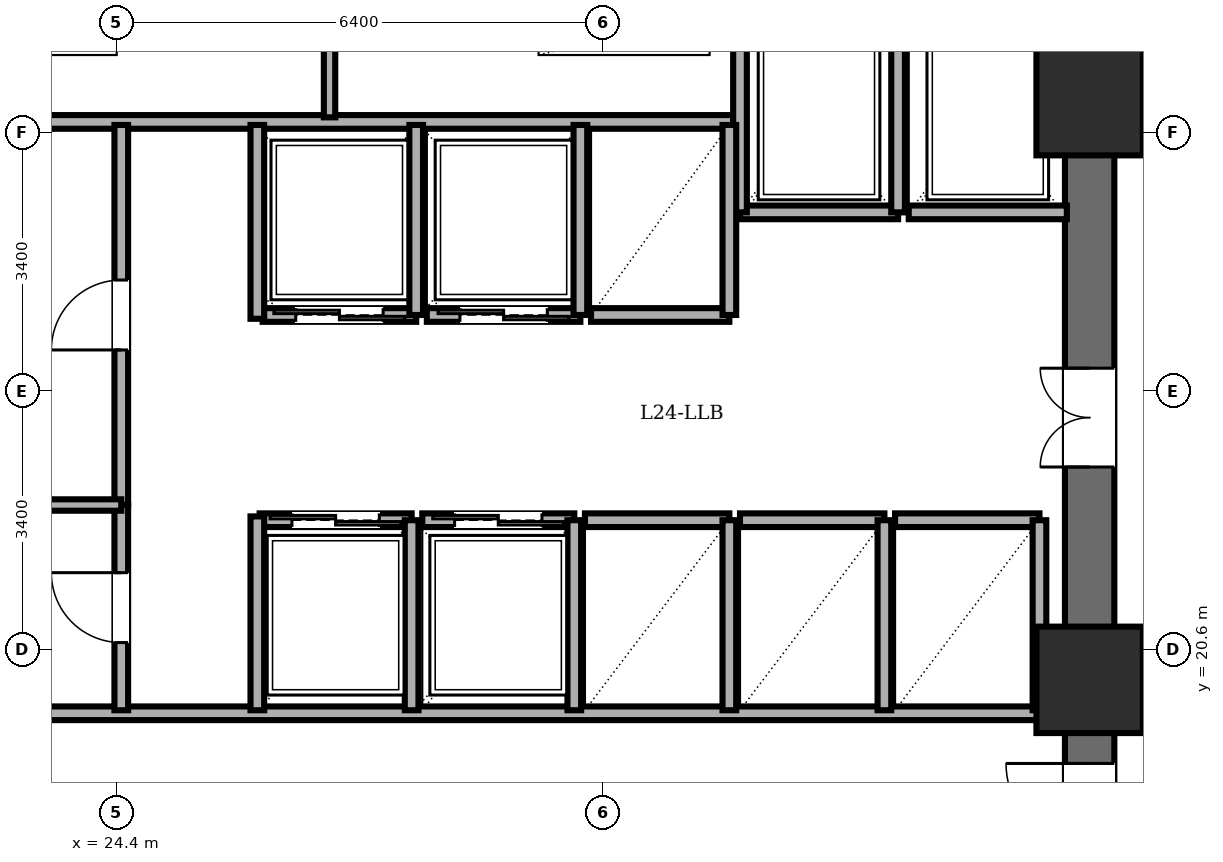
"""IFC4 building model, lengths in metres.
Left out: names, types, materials, properties, quantities, classifications, styles, units other than length and angle.
Written with IfcOpenShell. Run it as: python <this file> out.ifc"""

import sys

from ifc_helpers import new_model, si_unit, direction, frame, frame_2d, origin, origin_2d, place, context, subcontext, project, spatial, rectangle, extrude, element, fill, save


model = new_model("IFC4")
c1 = context("Model", 3, precision=1e-05, world=origin(), true_north=direction((0.0, 1.0)))
c2 = subcontext(c1, "Body", "Model", "MODEL_VIEW")
j1 = project(units=[si_unit("LENGTHUNIT", "METRE"), si_unit("PLANEANGLEUNIT", "RADIAN")], contexts=[c1])
p1 = place(None, origin())
s1 = spatial("IfcSite", under=j1, at=p1, CompositionType="ELEMENT")
p2 = place(p1, origin())
s2 = spatial("IfcBuilding", under=s1, at=p2, CompositionType="ELEMENT")
p3 = place(p2, frame((0.0, 0.0, 93.5)))
s3 = spatial("IfcBuildingStorey", under=s2, at=p3, CompositionType="ELEMENT", Elevation=93.5)
for number, where, z_axis, x_axis in (
    (1, (37.2, 20.2, 0.0), (0.0, 0.0, 1.0), (1.0, 0.0, 0.0)),
    (2, (37.2, 27.8, 0.0), (0.0, 0.0, 1.0), (1.0, 0.0, 0.0)),
):
    element("IfcColumn", number, at=place(p3, frame(where, z_axis=z_axis, x_axis=x_axis)), inside=s3, PredefinedType="COLUMN", context=c2, shape_type="SweptSolid", body=[
        extrude(rectangle(XDim=1.4, YDim=1.4, at=origin_2d()), origin(), (0.0, 0.0, 1.0), 3.6),
    ])
p4 = place(p3, frame((37.2, 14.4, 0.0), z_axis=(0.0, 0.0, 1.0), x_axis=(0.0, 1.0, 0.0)))
e3 = element("IfcWall", 3, at=p4, inside=s3, PredefinedType="SHEAR", context=c2, shape_type="SweptSolid", body=[
    extrude(rectangle(XDim=19.2, YDim=0.65, at=frame_2d((9.6, 0.0))), origin(), (0.0, 0.0, 1.0), 3.4),
])
p5 = place(p4, frame((15.8, 0.0, 0.0)))
e4 = element("IfcOpeningElement", 4, at=p5, cuts=e3, PredefinedType="OPENING", context=c2, shape_type="SweptSolid", body=[
    extrude(rectangle(XDim=1.15, YDim=2.15, at=frame_2d((0.575, 1.075))), frame((0.0, 0.335, 0.0), z_axis=(0.0, -1.0, 0.0), x_axis=(1.0, 0.0, 0.0)), (0.0, 0.0, 1.0), 0.67),
])
p6 = place(p4, frame((3.6, 0.0, 0.0)))
e5 = element("IfcOpeningElement", 5, at=p6, cuts=e3, PredefinedType="OPENING", context=c2, shape_type="SweptSolid", body=[
    extrude(rectangle(XDim=1.1, YDim=2.15, at=frame_2d((0.55, 1.075))), frame((0.0, 0.335, 0.0), z_axis=(0.0, -1.0, 0.0), x_axis=(1.0, 0.0, 0.0)), (0.0, 0.0, 1.0), 0.67),
])
p7 = place(p4, frame((8.6, 0.0, 0.0)))
e6 = element("IfcOpeningElement", 6, at=p7, cuts=e3, PredefinedType="OPENING", context=c2, shape_type="SweptSolid", body=[
    extrude(rectangle(XDim=1.3, YDim=2.2, at=frame_2d((0.65, 1.1))), frame((0.0, 0.335, 0.0), z_axis=(0.0, -1.0, 0.0), x_axis=(1.0, 0.0, 0.0)), (0.0, 0.0, 1.0), 0.67),
])
p8 = place(p3, frame((21.95, 27.54, 0.0), z_axis=(0.0, 0.0, 1.0), x_axis=(1.0, 0.0, 0.0)))
e7 = element("IfcWall", 7, at=p8, inside=s3, PredefinedType="PARTITIONING", context=c2, shape_type="SweptSolid", body=[
    extrude(rectangle(XDim=10.56, YDim=0.18, at=frame_2d((5.28, 0.0))), origin(), (0.0, 0.0, 1.0), 3.4),
])
p9 = place(p3, frame((27.2, 27.6, 0.0), z_axis=(0.0, 0.0, 1.0), x_axis=(0.0, 1.0, 0.0)))
e8 = element("IfcWall", 8, at=p9, inside=s3, PredefinedType="PARTITIONING", context=c2, shape_type="SweptSolid", body=[
    extrude(rectangle(XDim=1.52, YDim=0.15, at=frame_2d((0.76, 0.0))), origin(), (0.0, 0.0, 1.0), 3.4),
])
p10 = place(p3, frame((21.95, 19.76, 0.0), z_axis=(0.0, 0.0, 1.0), x_axis=(1.0, 0.0, 0.0)))
e9 = element("IfcWall", 9, at=p10, inside=s3, PredefinedType="PARTITIONING", context=c2, shape_type="SweptSolid", body=[
    extrude(rectangle(XDim=14.87, YDim=0.18, at=frame_2d((7.435, 0.0))), origin(), (0.0, 0.0, 1.0), 3.4),
])
p11 = place(p3, frame((34.68, 26.35, 0.0), z_axis=(0.0, 0.0, 1.0), x_axis=(-1.0, 0.0, 0.0)))
e10 = element("IfcWall", 10, at=p11, inside=s3, PredefinedType="PARTITIONING", context=c2, shape_type="SweptSolid", body=[
    extrude(rectangle(XDim=2.08, YDim=0.18, at=frame_2d((1.04, 0.0))), origin(), (0.0, 0.0, 1.0), 3.4),
])
for number, where, z_axis, x_axis in (
    (11, (34.68, 26.35, 0.0), (0.0, 0.0, 1.0), (0.0, 1.0, 0.0)),
    (12, (32.6, 29.08, 0.0), (0.0, 0.0, 1.0), (0.0, -1.0, 0.0)),
):
    element("IfcWall", number, at=place(p3, frame(where, z_axis=z_axis, x_axis=x_axis)), inside=s3, PredefinedType="PARTITIONING", context=c2, shape_type="SweptSolid", body=[
        extrude(rectangle(XDim=2.73, YDim=0.18, at=frame_2d((1.365, 0.0))), origin(), (0.0, 0.0, 1.0), 3.4),
    ])
p12 = place(p3, frame((36.9, 26.35, 0.0), z_axis=(0.0, 0.0, 1.0), x_axis=(-1.0, 0.0, 0.0)))
e13 = element("IfcWall", 13, at=p12, inside=s3, PredefinedType="PARTITIONING", context=c2, shape_type="SweptSolid", body=[
    extrude(rectangle(XDim=2.08, YDim=0.18, at=frame_2d((1.04, 0.0))), origin(), (0.0, 0.0, 1.0), 3.4),
])
p13 = place(p3, frame((28.34, 25.0, 0.0), z_axis=(0.0, 0.0, 1.0), x_axis=(-1.0, 0.0, 0.0)))
e14 = element("IfcWall", 14, at=p13, inside=s3, PredefinedType="PARTITIONING", context=c2, shape_type="SweptSolid", body=[
    extrude(rectangle(XDim=2.02, YDim=0.18, at=frame_2d((1.01, 0.0))), origin(), (0.0, 0.0, 1.0), 3.4),
])
p14 = place(p13, frame((0.435, 0.0, 0.0)))
e15 = element("IfcOpeningElement", 15, at=p14, cuts=e14, PredefinedType="OPENING", context=c2, shape_type="SweptSolid", body=[
    extrude(rectangle(XDim=1.15, YDim=2.2, at=frame_2d((0.575, 1.1))), frame((0.0, 0.1, 0.0), z_axis=(0.0, -1.0, 0.0), x_axis=(1.0, 0.0, 0.0)), (0.0, 0.0, 1.0), 0.2),
])
p15 = place(p3, frame((28.34, 25.0, 0.0), z_axis=(0.0, 0.0, 1.0), x_axis=(0.0, 1.0, 0.0)))
e16 = element("IfcWall", 16, at=p15, inside=s3, PredefinedType="PARTITIONING", context=c2, shape_type="SweptSolid", body=[
    extrude(rectangle(XDim=2.5, YDim=0.18, at=frame_2d((1.25, 0.0))), origin(), (0.0, 0.0, 1.0), 3.4),
])
p16 = place(p3, frame((30.5, 25.0, 0.0), z_axis=(0.0, 0.0, 1.0), x_axis=(-1.0, 0.0, 0.0)))
e17 = element("IfcWall", 17, at=p16, inside=s3, PredefinedType="PARTITIONING", context=c2, shape_type="SweptSolid", body=[
    extrude(rectangle(XDim=2.02, YDim=0.18, at=frame_2d((1.01, 0.0))), origin(), (0.0, 0.0, 1.0), 3.4),
])
p17 = place(p16, frame((0.435, 0.0, 0.0)))
e18 = element("IfcOpeningElement", 18, at=p17, cuts=e17, PredefinedType="OPENING", context=c2, shape_type="SweptSolid", body=[
    extrude(rectangle(XDim=1.15, YDim=2.2, at=frame_2d((0.575, 1.1))), frame((0.0, 0.1, 0.0), z_axis=(0.0, -1.0, 0.0), x_axis=(1.0, 0.0, 0.0)), (0.0, 0.0, 1.0), 0.2),
])
p18 = place(p3, frame((30.5, 25.0, 0.0), z_axis=(0.0, 0.0, 1.0), x_axis=(0.0, 1.0, 0.0)))
e19 = element("IfcWall", 19, at=p18, inside=s3, PredefinedType="PARTITIONING", context=c2, shape_type="SweptSolid", body=[
    extrude(rectangle(XDim=2.5, YDim=0.18, at=frame_2d((1.25, 0.0))), origin(), (0.0, 0.0, 1.0), 3.4),
])
p19 = place(p3, frame((26.28, 22.3, 0.0), z_axis=(0.0, 0.0, 1.0), x_axis=(1.0, 0.0, 0.0)))
e20 = element("IfcWall", 20, at=p19, inside=s3, PredefinedType="PARTITIONING", context=c2, shape_type="SweptSolid", body=[
    extrude(rectangle(XDim=2.0, YDim=0.18, at=frame_2d((1.0, 0.0))), origin(), (0.0, 0.0, 1.0), 3.4),
])
p20 = place(p19, frame((0.425, 0.0, 0.0)))
e21 = element("IfcOpeningElement", 21, at=p20, cuts=e20, PredefinedType="OPENING", context=c2, shape_type="SweptSolid", body=[
    extrude(rectangle(XDim=1.15, YDim=2.2, at=frame_2d((0.575, 1.1))), frame((0.0, 0.1, 0.0), z_axis=(0.0, -1.0, 0.0), x_axis=(1.0, 0.0, 0.0)), (0.0, 0.0, 1.0), 0.2),
])
p21 = place(p3, frame((28.28, 19.8, 0.0), z_axis=(0.0, 0.0, 1.0), x_axis=(0.0, 1.0, 0.0)))
e22 = element("IfcWall", 22, at=p21, inside=s3, PredefinedType="PARTITIONING", context=c2, shape_type="SweptSolid", body=[
    extrude(rectangle(XDim=2.5, YDim=0.18, at=frame_2d((1.25, 0.0))), origin(), (0.0, 0.0, 1.0), 3.4),
])
p22 = place(p3, frame((28.42, 22.3, 0.0), z_axis=(0.0, 0.0, 1.0), x_axis=(1.0, 0.0, 0.0)))
e23 = element("IfcWall", 23, at=p22, inside=s3, PredefinedType="PARTITIONING", context=c2, shape_type="SweptSolid", body=[
    extrude(rectangle(XDim=2.0, YDim=0.18, at=frame_2d((1.0, 0.0))), origin(), (0.0, 0.0, 1.0), 3.4),
])
p23 = place(p22, frame((0.425, 0.0, 0.0)))
e24 = element("IfcOpeningElement", 24, at=p23, cuts=e23, PredefinedType="OPENING", context=c2, shape_type="SweptSolid", body=[
    extrude(rectangle(XDim=1.15, YDim=2.2, at=frame_2d((0.575, 1.1))), frame((0.0, 0.1, 0.0), z_axis=(0.0, -1.0, 0.0), x_axis=(1.0, 0.0, 0.0)), (0.0, 0.0, 1.0), 0.2),
])
p24 = place(p3, frame((30.42, 19.8, 0.0), z_axis=(0.0, 0.0, 1.0), x_axis=(0.0, 1.0, 0.0)))
e25 = element("IfcWall", 25, at=p24, inside=s3, PredefinedType="PARTITIONING", context=c2, shape_type="SweptSolid", body=[
    extrude(rectangle(XDim=2.5, YDim=0.18, at=frame_2d((1.25, 0.0))), origin(), (0.0, 0.0, 1.0), 3.4),
])
p25 = place(p3, frame((32.46, 25.0, 0.0), z_axis=(0.0, 0.0, 1.0), x_axis=(-1.0, 0.0, 0.0)))
e26 = element("IfcWall", 26, at=p25, inside=s3, PredefinedType="PARTITIONING", context=c2, shape_type="SweptSolid", body=[
    extrude(rectangle(XDim=1.82, YDim=0.18, at=frame_2d((0.91, 0.0))), origin(), (0.0, 0.0, 1.0), 3.4),
])
p26 = place(p3, frame((32.46, 25.0, 0.0), z_axis=(0.0, 0.0, 1.0), x_axis=(0.0, 1.0, 0.0)))
e27 = element("IfcWall", 27, at=p26, inside=s3, PredefinedType="PARTITIONING", context=c2, shape_type="SweptSolid", body=[
    extrude(rectangle(XDim=2.5, YDim=0.18, at=frame_2d((1.25, 0.0))), origin(), (0.0, 0.0, 1.0), 3.4),
])
p27 = place(p3, frame((30.56, 22.3, 0.0), z_axis=(0.0, 0.0, 1.0), x_axis=(1.0, 0.0, 0.0)))
e28 = element("IfcWall", 28, at=p27, inside=s3, PredefinedType="PARTITIONING", context=c2, shape_type="SweptSolid", body=[
    extrude(rectangle(XDim=1.9, YDim=0.18, at=frame_2d((0.95, 0.0))), origin(), (0.0, 0.0, 1.0), 3.4),
])
p28 = place(p3, frame((32.46, 19.8, 0.0), z_axis=(0.0, 0.0, 1.0), x_axis=(0.0, 1.0, 0.0)))
e29 = element("IfcWall", 29, at=p28, inside=s3, PredefinedType="PARTITIONING", context=c2, shape_type="SweptSolid", body=[
    extrude(rectangle(XDim=2.5, YDim=0.18, at=frame_2d((1.25, 0.0))), origin(), (0.0, 0.0, 1.0), 3.4),
])
p29 = place(p3, frame((32.6, 22.3, 0.0), z_axis=(0.0, 0.0, 1.0), x_axis=(1.0, 0.0, 0.0)))
e30 = element("IfcWall", 30, at=p29, inside=s3, PredefinedType="PARTITIONING", context=c2, shape_type="SweptSolid", body=[
    extrude(rectangle(XDim=1.9, YDim=0.18, at=frame_2d((0.95, 0.0))), origin(), (0.0, 0.0, 1.0), 3.4),
])
p30 = place(p3, frame((34.5, 19.8, 0.0), z_axis=(0.0, 0.0, 1.0), x_axis=(0.0, 1.0, 0.0)))
e31 = element("IfcWall", 31, at=p30, inside=s3, PredefinedType="PARTITIONING", context=c2, shape_type="SweptSolid", body=[
    extrude(rectangle(XDim=2.5, YDim=0.18, at=frame_2d((1.25, 0.0))), origin(), (0.0, 0.0, 1.0), 3.4),
])
p31 = place(p3, frame((34.64, 22.3, 0.0), z_axis=(0.0, 0.0, 1.0), x_axis=(1.0, 0.0, 0.0)))
e32 = element("IfcWall", 32, at=p31, inside=s3, PredefinedType="PARTITIONING", context=c2, shape_type="SweptSolid", body=[
    extrude(rectangle(XDim=1.9, YDim=0.18, at=frame_2d((0.95, 0.0))), origin(), (0.0, 0.0, 1.0), 3.4),
])
p32 = place(p3, frame((36.54, 19.8, 0.0), z_axis=(0.0, 0.0, 1.0), x_axis=(0.0, 1.0, 0.0)))
e33 = element("IfcWall", 33, at=p32, inside=s3, PredefinedType="PARTITIONING", context=c2, shape_type="SweptSolid", body=[
    extrude(rectangle(XDim=2.5, YDim=0.18, at=frame_2d((1.25, 0.0))), origin(), (0.0, 0.0, 1.0), 3.4),
])
p33 = place(p3, frame((24.46, 22.5, 0.0), z_axis=(0.0, 0.0, 1.0), x_axis=(0.0, 1.0, 0.0)))
e34 = element("IfcWall", 34, at=p33, inside=s3, PredefinedType="PARTITIONING", context=c2, shape_type="SweptSolid", body=[
    extrude(rectangle(XDim=5.0, YDim=0.18, at=frame_2d((2.5, 0.0))), origin(), (0.0, 0.0, 1.0), 3.4),
])
p34 = place(p33, frame((2.04, 0.0, 0.0)))
e35 = element("IfcOpeningElement", 35, at=p34, cuts=e34, PredefinedType="OPENING", context=c2, shape_type="SweptSolid", body=[
    extrude(rectangle(XDim=0.92, YDim=2.1, at=frame_2d((0.46, 1.05))), frame((0.0, 0.1, 0.0), z_axis=(0.0, -1.0, 0.0), x_axis=(1.0, 0.0, 0.0)), (0.0, 0.0, 1.0), 0.2),
])
p35 = place(p3, frame((24.46, 19.8, 0.0), z_axis=(0.0, 0.0, 1.0), x_axis=(0.0, 1.0, 0.0)))
e36 = element("IfcWall", 36, at=p35, inside=s3, PredefinedType="PARTITIONING", context=c2, shape_type="SweptSolid", body=[
    extrude(rectangle(XDim=2.7, YDim=0.18, at=frame_2d((1.35, 0.0))), origin(), (0.0, 0.0, 1.0), 3.4),
])
p36 = place(p35, frame((0.89, 0.0, 0.0)))
e37 = element("IfcOpeningElement", 37, at=p36, cuts=e36, PredefinedType="OPENING", context=c2, shape_type="SweptSolid", body=[
    extrude(rectangle(XDim=0.92, YDim=2.1, at=frame_2d((0.46, 1.05))), frame((0.0, 0.1, 0.0), z_axis=(0.0, -1.0, 0.0), x_axis=(1.0, 0.0, 0.0)), (0.0, 0.0, 1.0), 0.2),
])
p37 = place(p3, frame((21.95, 22.5, 0.0), z_axis=(0.0, 0.0, 1.0), x_axis=(1.0, 0.0, 0.0)))
e38 = element("IfcWall", 38, at=p37, inside=s3, PredefinedType="PARTITIONING", context=c2, shape_type="SweptSolid", body=[
    extrude(rectangle(XDim=2.51, YDim=0.15, at=frame_2d((1.255, 0.0))), origin(), (0.0, 0.0, 1.0), 3.4),
])
for number, where, z_axis, x_axis in (
    (39, (26.25, 24.95, 0.0), (0.0, 0.0, 1.0), (0.0, 1.0, 0.0)),
    (40, (26.25, 19.8, 0.0), (0.0, 0.0, 1.0), (0.0, 1.0, 0.0)),
):
    element("IfcWall", number, at=place(p3, frame(where, z_axis=z_axis, x_axis=x_axis)), inside=s3, PredefinedType="PARTITIONING", context=c2, shape_type="SweptSolid", body=[
        extrude(rectangle(XDim=2.55, YDim=0.18, at=frame_2d((1.275, 0.0))), origin(), (0.0, 0.0, 1.0), 3.4),
    ])
p38 = place(p6, origin())
e41 = element("IfcDoor", 41, at=p38, inside=s3, OperationType="SINGLE_SWING_RIGHT", PredefinedType="DOOR", context=c2, shape_type="SweptSolid", body=[
    extrude(rectangle(XDim=1.1, YDim=2.15, at=frame_2d((0.55, 1.075))), frame((0.0, 0.025, 0.0), z_axis=(0.0, -1.0, 0.0), x_axis=(1.0, 0.0, 0.0)), (0.0, 0.0, 1.0), 0.05),
])
fill(e5, e41)
p39 = place(p14, origin())
e42 = element("IfcDoor", 42, at=p39, inside=s3, OperationType="DOUBLE_DOOR_SLIDING", PredefinedType="DOOR", context=c2, shape_type="SweptSolid", body=[
    extrude(rectangle(XDim=1.15, YDim=2.2, at=frame_2d((0.575, 1.1))), frame((0.0, 0.025, 0.0), z_axis=(0.0, -1.0, 0.0), x_axis=(1.0, 0.0, 0.0)), (0.0, 0.0, 1.0), 0.05),
])
fill(e15, e42)
p40 = place(p17, origin())
e43 = element("IfcDoor", 43, at=p40, inside=s3, OperationType="DOUBLE_DOOR_SLIDING", PredefinedType="DOOR", context=c2, shape_type="SweptSolid", body=[
    extrude(rectangle(XDim=1.15, YDim=2.2, at=frame_2d((0.575, 1.1))), frame((0.0, 0.025, 0.0), z_axis=(0.0, -1.0, 0.0), x_axis=(1.0, 0.0, 0.0)), (0.0, 0.0, 1.0), 0.05),
])
fill(e18, e43)
p41 = place(p20, origin())
e44 = element("IfcDoor", 44, at=p41, inside=s3, OperationType="DOUBLE_DOOR_SLIDING", PredefinedType="DOOR", context=c2, shape_type="SweptSolid", body=[
    extrude(rectangle(XDim=1.15, YDim=2.2, at=frame_2d((0.575, 1.1))), frame((0.0, 0.025, 0.0), z_axis=(0.0, -1.0, 0.0), x_axis=(1.0, 0.0, 0.0)), (0.0, 0.0, 1.0), 0.05),
])
fill(e21, e44)
p42 = place(p23, origin())
e45 = element("IfcDoor", 45, at=p42, inside=s3, OperationType="DOUBLE_DOOR_SLIDING", PredefinedType="DOOR", context=c2, shape_type="SweptSolid", body=[
    extrude(rectangle(XDim=1.15, YDim=2.2, at=frame_2d((0.575, 1.1))), frame((0.0, 0.025, 0.0), z_axis=(0.0, -1.0, 0.0), x_axis=(1.0, 0.0, 0.0)), (0.0, 0.0, 1.0), 0.05),
])
fill(e24, e45)
p43 = place(p34, origin())
e46 = element("IfcDoor", 46, at=p43, inside=s3, OperationType="SINGLE_SWING_LEFT", PredefinedType="DOOR", context=c2, shape_type="SweptSolid", body=[
    extrude(rectangle(XDim=0.92, YDim=2.1, at=frame_2d((0.46, 1.05))), frame((0.0, 0.025, 0.0), z_axis=(0.0, -1.0, 0.0), x_axis=(1.0, 0.0, 0.0)), (0.0, 0.0, 1.0), 0.05),
])
fill(e35, e46)
p44 = place(p36, origin())
e47 = element("IfcDoor", 47, at=p44, inside=s3, OperationType="SINGLE_SWING_RIGHT", PredefinedType="DOOR", context=c2, shape_type="SweptSolid", body=[
    extrude(rectangle(XDim=0.92, YDim=2.1, at=frame_2d((0.46, 1.05))), frame((0.0, 0.025, 0.0), z_axis=(0.0, -1.0, 0.0), x_axis=(1.0, 0.0, 0.0)), (0.0, 0.0, 1.0), 0.05),
])
fill(e37, e47)
p45 = place(p7, origin())
e48 = element("IfcDoor", 48, at=p45, inside=s3, OperationType="DOUBLE_DOOR_SINGLE_SWING", PredefinedType="DOOR", context=c2, shape_type="SweptSolid", body=[
    extrude(rectangle(XDim=1.3, YDim=2.2, at=frame_2d((0.65, 1.1))), frame((0.0, 0.025, 0.0), z_axis=(0.0, -1.0, 0.0), x_axis=(1.0, 0.0, 0.0)), (0.0, 0.0, 1.0), 0.05),
])
fill(e6, e48)
save(model, sys.argv[1])
